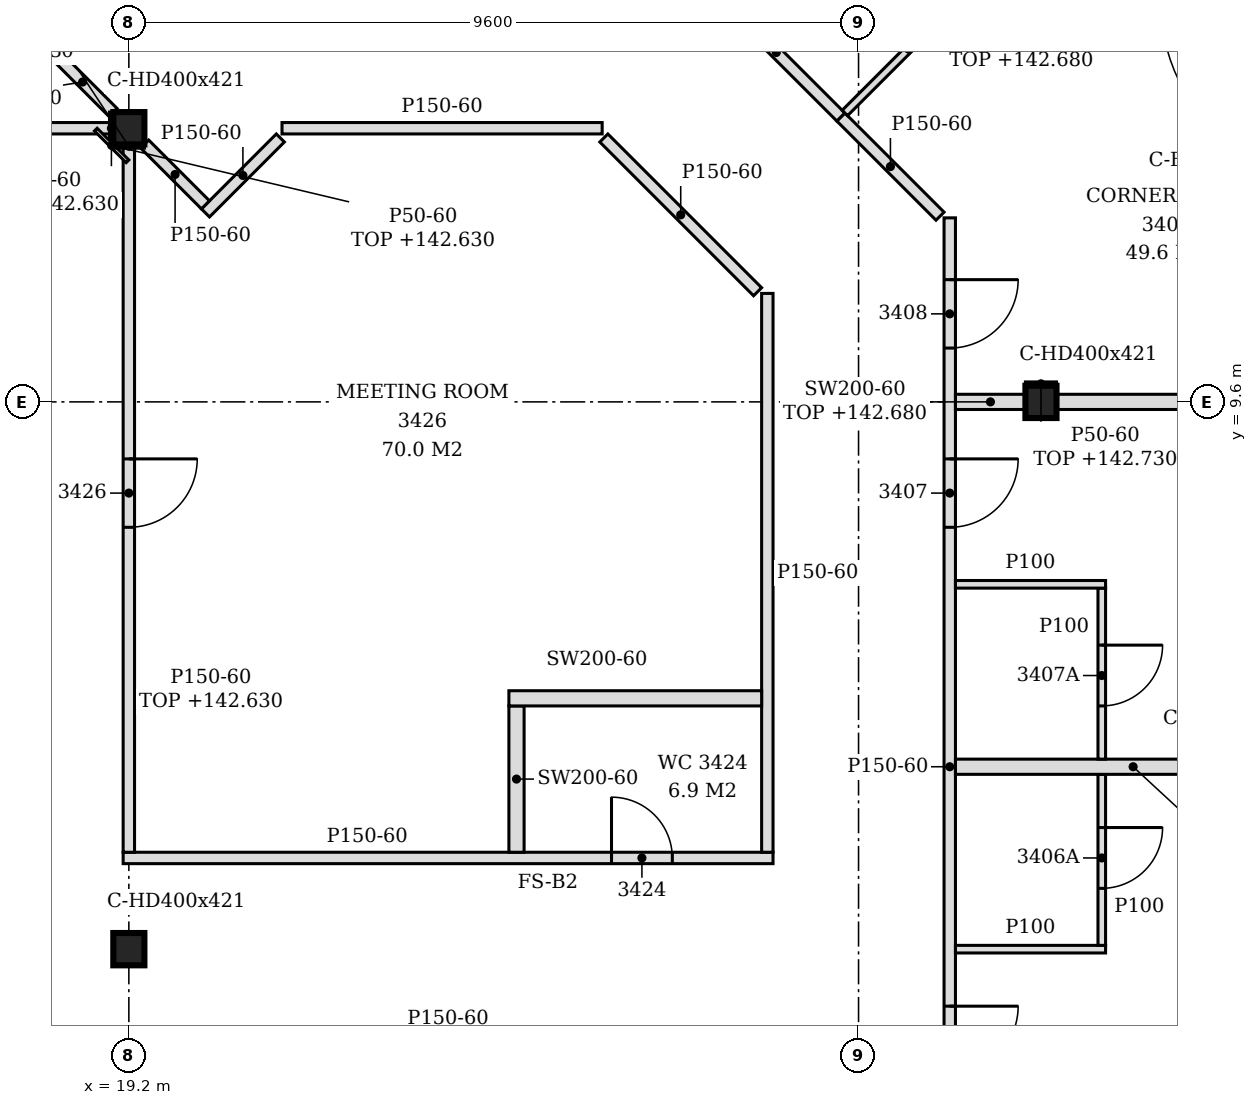
"""IFC4 building model, lengths in metres.
Left out: names, types, materials, properties, quantities, classifications, styles, units other than length and angle.
Written with IfcOpenShell. Run it as: python <this file> out.ifc"""

import sys

from ifc_helpers import new_model, si_unit, direction, frame, frame_2d, origin, origin_2d, place, context, subcontext, project, spatial, polyline, rectangle, i_section, outline, extrude, element, fill, save


model = new_model("IFC4")
c1 = context("Model", 3, precision=1e-05, world=origin(), true_north=direction((0.0, 1.0)))
c2 = subcontext(c1, "Body", "Model", "MODEL_VIEW")
j1 = project(units=[si_unit("LENGTHUNIT", "METRE"), si_unit("PLANEANGLEUNIT", "RADIAN")], contexts=[c1])
p1 = place(None, origin())
s1 = spatial("IfcSite", under=j1, at=p1, CompositionType="ELEMENT")
p2 = place(p1, origin())
s2 = spatial("IfcBuilding", under=s1, at=p2, CompositionType="ELEMENT")
p3 = place(p2, frame((0.0, 0.0, 139.8)))
s3 = spatial("IfcBuildingStorey", under=s2, at=p3, CompositionType="ELEMENT", Elevation=139.8)
for number, where, z_axis, x_axis in (
    (1, (19.2, 2.4, -0.15), (0.0, 0.0, 1.0), (1.0, 0.0, 0.0)),
    (2, (19.2, 13.2, -0.15), (0.0, 0.0, 1.0), (1.0, 0.0, 0.0)),
    (3, (31.2, 9.6, -0.15), (0.0, 0.0, 1.0), (1.0, 0.0, 0.0)),
):
    element("IfcColumn", number, at=place(p3, frame(where, z_axis=z_axis, x_axis=x_axis)), inside=s3, PredefinedType="COLUMN", context=c2, shape_type="SweptSolid", body=[
        extrude(i_section(OverallWidth=0.409, OverallDepth=0.425, WebThickness=0.033, FlangeThickness=0.052, FilletRadius=0.015, at=origin_2d()), origin(), (0.0, 0.0, 1.0), 3.6),
    ])
p4 = place(p3, frame((30.0, -0.813, 0.0), z_axis=(0.0, 0.0, 1.0), x_axis=(0.0, 1.0, 0.0)))
e4 = element("IfcWall", 4, at=p4, inside=s3, PredefinedType="PARTITIONING", context=c2, shape_type="SweptSolid", body=[
    extrude(outline(polyline([(0.0, 0.0), (12.834, 0.0), (12.834, 3.45), (10.518, 3.45), (10.516, 2.88), (10.308, 2.88), (10.306, 3.45), (5.718, 3.45), (5.716, 2.88), (5.508, 2.88), (5.506, 3.45), (0.918, 3.45), (0.916, 2.88), (0.708, 2.88), (0.706, 3.45), (0.0, 3.45), (0.0, 0.0)])), frame((0.0, 0.075, 0.0), z_axis=(0.0, -1.0, 0.0), x_axis=(1.0, 0.0, 0.0)), (0.0, 0.0, 1.0), 0.15),
])
p5 = place(p4, frame((1.563, 0.0, 0.0)))
e5 = element("IfcOpeningElement", 5, at=p5, cuts=e4, PredefinedType="OPENING", context=c2, shape_type="SweptSolid", body=[
    extrude(rectangle(XDim=0.9, YDim=2.1, at=frame_2d((0.45, 1.05))), frame((0.0, 0.085, 0.0), z_axis=(0.0, -1.0, 0.0), x_axis=(1.0, 0.0, 0.0)), (0.0, 0.0, 1.0), 0.17),
])
p6 = place(p4, frame((8.763, 0.0, 0.0)))
e6 = element("IfcOpeningElement", 6, at=p6, cuts=e4, PredefinedType="OPENING", context=c2, shape_type="SweptSolid", body=[
    extrude(rectangle(XDim=0.9, YDim=2.1, at=frame_2d((0.45, 1.05))), frame((0.0, 0.085, 0.0), z_axis=(0.0, -1.0, 0.0), x_axis=(1.0, 0.0, 0.0)), (0.0, 0.0, 1.0), 0.17),
])
p7 = place(p4, frame((11.121, 0.0, 0.0)))
e7 = element("IfcOpeningElement", 7, at=p7, cuts=e4, PredefinedType="OPENING", context=c2, shape_type="SweptSolid", body=[
    extrude(rectangle(XDim=0.9, YDim=2.1, at=frame_2d((0.45, 1.05))), frame((0.0, 0.085, 0.0), z_axis=(0.0, -1.0, 0.0), x_axis=(1.0, 0.0, 0.0)), (0.0, 0.0, 1.0), 0.17),
])
p8 = place(p3, frame((30.075, 2.4, 0.0), z_axis=(0.0, 0.0, 1.0), x_axis=(1.0, 0.0, 0.0)))
e8 = element("IfcWall", 8, at=p8, inside=s3, PredefinedType="PARTITIONING", context=c2, shape_type="SweptSolid", body=[
    extrude(outline(polyline([(0.0, 0.0), (1.975, 0.0), (1.975, 3.45), (1.275, 3.45), (1.273, 2.93), (0.975, 2.93), (0.973, 3.45), (0.0, 3.45), (0.0, 0.0)])), frame((0.0, 0.05, 0.0), z_axis=(0.0, -1.0, 0.0), x_axis=(1.0, 0.0, 0.0)), (0.0, 0.0, 1.0), 0.1),
])
p9 = place(p3, frame((32.0, 2.45, 0.0), z_axis=(0.0, 0.0, 1.0), x_axis=(0.0, 1.0, 0.0)))
e9 = element("IfcWall", 9, at=p9, inside=s3, PredefinedType="PARTITIONING", context=c2, shape_type="SweptSolid", body=[
    extrude(rectangle(XDim=2.25, YDim=0.1, at=frame_2d((1.125, 0.0))), origin(), (0.0, 0.0, 1.0), 3.45),
])
p10 = place(p9, frame((0.75, 0.0, 0.0)))
e10 = element("IfcOpeningElement", 10, at=p10, cuts=e9, PredefinedType="OPENING", context=c2, shape_type="SweptSolid", body=[
    extrude(rectangle(XDim=0.8, YDim=2.1, at=frame_2d((0.4, 1.05))), frame((0.0, 0.06, 0.0), z_axis=(0.0, -1.0, 0.0), x_axis=(1.0, 0.0, 0.0)), (0.0, 0.0, 1.0), 0.12),
])
p11 = place(p3, frame((19.125, 3.6, 0.0), z_axis=(0.0, 0.0, 1.0), x_axis=(1.0, 0.0, 0.0)))
e11 = element("IfcWall", 11, at=p11, inside=s3, PredefinedType="PARTITIONING", context=c2, shape_type="SweptSolid", body=[
    extrude(outline(polyline([(0.0, 0.0), (8.55, 0.0), (8.55, 3.45), (0.225, 3.45), (0.223, 2.83), (0.0, 2.83), (0.0, 0.0)])), frame((0.0, 0.075, 0.0), z_axis=(0.0, -1.0, 0.0), x_axis=(1.0, 0.0, 0.0)), (0.0, 0.0, 1.0), 0.15),
])
p12 = place(p11, frame((6.425, 0.0, 0.0)))
e12 = element("IfcOpeningElement", 12, at=p12, cuts=e11, PredefinedType="OPENING", context=c2, shape_type="SweptSolid", body=[
    extrude(rectangle(XDim=0.8, YDim=2.1, at=frame_2d((0.4, 1.05))), frame((0.0, 0.085, 0.0), z_axis=(0.0, -1.0, 0.0), x_axis=(1.0, 0.0, 0.0)), (0.0, 0.0, 1.0), 0.17),
])
p13 = place(p3, frame((19.2, 3.675, 0.0), z_axis=(0.0, 0.0, 1.0), x_axis=(0.0, 1.0, 0.0)))
e13 = element("IfcWall", 13, at=p13, inside=s3, PredefinedType="PARTITIONING", context=c2, shape_type="SweptSolid", body=[
    extrude(rectangle(XDim=9.312, YDim=0.15, at=frame_2d((4.656, 0.0))), origin(), (0.0, 0.0, 1.0), 2.83),
])
p14 = place(p13, frame((4.275, 0.0, 0.0)))
e14 = element("IfcOpeningElement", 14, at=p14, cuts=e13, PredefinedType="OPENING", context=c2, shape_type="SweptSolid", body=[
    extrude(rectangle(XDim=0.9, YDim=2.1, at=frame_2d((0.45, 1.05))), frame((0.0, 0.085, 0.0), z_axis=(0.0, -1.0, 0.0), x_axis=(1.0, 0.0, 0.0)), (0.0, 0.0, 1.0), 0.17),
])
p15 = place(p3, frame((24.3, 3.675, 0.0), z_axis=(0.0, 0.0, 1.0), x_axis=(0.0, 1.0, 0.0)))
e15 = element("IfcWall", 15, at=p15, inside=s3, PredefinedType="PARTITIONING", context=c2, shape_type="SweptSolid", body=[
    extrude(outline(polyline([(0.0, 0.0), (1.925, 0.0), (1.925, 3.45), (1.23, 3.45), (1.228, 2.88), (1.02, 2.88), (1.018, 3.45), (0.0, 3.45), (0.0, 0.0)])), frame((0.0, 0.1, 0.0), z_axis=(0.0, -1.0, 0.0), x_axis=(1.0, 0.0, 0.0)), (0.0, 0.0, 1.0), 0.2),
])
p16 = place(p3, frame((27.6, 3.675, 0.0), z_axis=(0.0, 0.0, 1.0), x_axis=(0.0, 1.0, 0.0)))
e16 = element("IfcWall", 16, at=p16, inside=s3, PredefinedType="PARTITIONING", context=c2, shape_type="SweptSolid", body=[
    extrude(outline(polyline([(0.0, 0.0), (7.352, 0.0), (7.352, 3.45), (6.03, 3.45), (6.028, 2.88), (5.82, 2.88), (5.818, 3.45), (1.23, 3.45), (1.228, 2.88), (1.02, 2.88), (1.018, 3.45), (0.0, 3.45), (0.0, 0.0)])), frame((0.0, 0.075, 0.0), z_axis=(0.0, -1.0, 0.0), x_axis=(1.0, 0.0, 0.0)), (0.0, 0.0, 1.0), 0.15),
])
p17 = place(p3, frame((30.075, 4.8, 0.0), z_axis=(0.0, 0.0, 1.0), x_axis=(1.0, 0.0, 0.0)))
e17 = element("IfcWall", 17, at=p17, inside=s3, PredefinedType="PARTITIONING", context=c2, shape_type="SweptSolid", body=[
    extrude(rectangle(XDim=4.675, YDim=0.2, at=frame_2d((2.337, 0.0))), origin(), (0.0, 0.0, 1.0), 2.88),
])
p18 = place(p3, frame((32.0, 4.9, 0.0), z_axis=(0.0, 0.0, 1.0), x_axis=(0.0, 1.0, 0.0)))
e18 = element("IfcWall", 18, at=p18, inside=s3, PredefinedType="PARTITIONING", context=c2, shape_type="SweptSolid", body=[
    extrude(rectangle(XDim=2.25, YDim=0.1, at=frame_2d((1.125, 0.0))), origin(), (0.0, 0.0, 1.0), 3.45),
])
p19 = place(p18, frame((0.7, 0.0, 0.0)))
e19 = element("IfcOpeningElement", 19, at=p19, cuts=e18, PredefinedType="OPENING", context=c2, shape_type="SweptSolid", body=[
    extrude(rectangle(XDim=0.8, YDim=2.1, at=frame_2d((0.4, 1.05))), frame((0.0, 0.06, 0.0), z_axis=(0.0, -1.0, 0.0), x_axis=(1.0, 0.0, 0.0)), (0.0, 0.0, 1.0), 0.12),
])
p20 = place(p3, frame((24.2, 5.7, 0.0), z_axis=(0.0, 0.0, 1.0), x_axis=(1.0, 0.0, 0.0)))
e20 = element("IfcWall", 20, at=p20, inside=s3, PredefinedType="PARTITIONING", context=c2, shape_type="SweptSolid", body=[
    extrude(rectangle(XDim=3.325, YDim=0.2, at=frame_2d((1.663, 0.0))), origin(), (0.0, 0.0, 1.0), 3.45),
])
p21 = place(p3, frame((30.075, 7.2, 0.0), z_axis=(0.0, 0.0, 1.0), x_axis=(1.0, 0.0, 0.0)))
e21 = element("IfcWall", 21, at=p21, inside=s3, PredefinedType="PARTITIONING", context=c2, shape_type="SweptSolid", body=[
    extrude(outline(polyline([(0.0, 0.0), (1.975, 0.0), (1.975, 3.45), (1.275, 3.45), (1.273, 2.93), (0.975, 2.93), (0.973, 3.45), (0.0, 3.45), (0.0, 0.0)])), frame((0.0, 0.05, 0.0), z_axis=(0.0, -1.0, 0.0), x_axis=(1.0, 0.0, 0.0)), (0.0, 0.0, 1.0), 0.1),
])
p22 = place(p3, frame((30.075, 9.6, 0.0), z_axis=(0.0, 0.0, 1.0), x_axis=(1.0, 0.0, 0.0)))
e22 = element("IfcWall", 22, at=p22, inside=s3, PredefinedType="PARTITIONING", context=c2, shape_type="SweptSolid", body=[
    extrude(rectangle(XDim=0.921, YDim=0.2, at=frame_2d((0.46, 0.0))), origin(), (0.0, 0.0, 1.0), 2.88),
])
p23 = place(p3, frame((31.405, 9.6, 0.0), z_axis=(0.0, 0.0, 1.0), x_axis=(1.0, 0.0, 0.0)))
e23 = element("IfcWall", 23, at=p23, inside=s3, PredefinedType="PARTITIONING", context=c2, shape_type="SweptSolid", body=[
    extrude(outline(polyline([(0.0, 0.0), (4.245, 0.0), (4.246, 3.07), (3.845, 3.07), (3.844, 2.93), (3.545, 2.93), (3.543, 3.07), (0.0, 3.07), (0.0, 0.0)])), frame((0.0, 0.1, 0.0), z_axis=(0.0, -1.0, 0.0), x_axis=(1.0, 0.0, 0.0)), (0.0, 0.0, 1.0), 0.2),
])
p24 = place(p3, frame((27.472, 11.049, 0.0), z_axis=(0.0, 0.0, 1.0), x_axis=(-0.707106781187, 0.707106781187, 0.0)))
e24 = element("IfcWall", 24, at=p24, inside=s3, PredefinedType="PARTITIONING", context=c2, shape_type="SweptSolid", body=[
    extrude(rectangle(XDim=2.861, YDim=0.15, at=frame_2d((1.43, 0.0))), origin(), (0.0, 0.0, 1.0), 3.45),
])
p25 = place(p3, frame((29.872, 12.043, 0.0), z_axis=(0.0, 0.0, 1.0), x_axis=(-0.707172918471, 0.707040637716, 0.0)))
e25 = element("IfcWall", 25, at=p25, inside=s3, PredefinedType="PARTITIONING", context=c2, shape_type="SweptSolid", body=[
    extrude(rectangle(XDim=1.846, YDim=0.15, at=frame_2d((0.923, 0.0))), origin(), (0.0, 0.0, 1.0), 3.45),
])
p26 = place(p3, frame((20.208, 12.086, 0.0), z_axis=(0.0, 0.0, 1.0), x_axis=(0.706756381459, 0.707457007363, 0.0)))
e26 = element("IfcWall", 26, at=p26, inside=s3, PredefinedType="PARTITIONING", context=c2, shape_type="SweptSolid", body=[
    extrude(rectangle(XDim=1.394, YDim=0.15, at=frame_2d((0.697, 0.0))), origin(), (0.0, 0.0, 1.0), 3.45),
])
p27 = place(p3, frame((20.208, 12.192, 0.0), z_axis=(0.0, 0.0, 1.0), x_axis=(-0.70721474466, 0.706998801226, 0.0)))
e27 = element("IfcWall", 27, at=p27, inside=s3, PredefinedType="PARTITIONING", context=c2, shape_type="SweptSolid", body=[
    extrude(rectangle(XDim=1.131, YDim=0.15, at=frame_2d((0.565, 0.0))), origin(), (0.0, 0.0, 1.0), 3.45),
])
p28 = place(p3, frame((7.405, 13.2, 0.0), z_axis=(0.0, 0.0, 1.0), x_axis=(1.0, 0.0, 0.0)))
e28 = element("IfcWall", 28, at=p28, inside=s3, PredefinedType="PARTITIONING", context=c2, shape_type="SweptSolid", body=[
    extrude(rectangle(XDim=11.591, YDim=0.15, at=frame_2d((5.795, 0.0))), origin(), (0.0, 0.0, 1.0), 2.83),
])
p29 = place(p28, frame((5.345, 0.0, 0.0)))
e29 = element("IfcOpeningElement", 29, at=p29, cuts=e28, PredefinedType="OPENING", context=c2, shape_type="SweptSolid", body=[
    extrude(rectangle(XDim=0.9, YDim=2.1, at=frame_2d((0.45, 1.05))), frame((0.0, 0.085, 0.0), z_axis=(0.0, -1.0, 0.0), x_axis=(1.0, 0.0, 0.0)), (0.0, 0.0, 1.0), 0.17),
])
p30 = place(p3, frame((21.215, 13.2, 0.0), z_axis=(0.0, 0.0, 1.0), x_axis=(1.0, 0.0, 0.0)))
e30 = element("IfcWall", 30, at=p30, inside=s3, PredefinedType="PARTITIONING", context=c2, shape_type="SweptSolid", body=[
    extrude(rectangle(XDim=4.212, YDim=0.15, at=frame_2d((2.106, 0.0))), origin(), (0.0, 0.0, 1.0), 3.45),
])
p31 = place(p3, frame((28.567, 13.348, 0.0), z_axis=(0.0, 0.0, 1.0), x_axis=(-0.707310148094, 0.706903355773, 0.0)))
e31 = element("IfcWall", 31, at=p31, inside=s3, PredefinedType="PARTITIONING", context=c2, shape_type="SweptSolid", body=[
    extrude(rectangle(XDim=2.401, YDim=0.15, at=frame_2d((1.2, 0.0))), origin(), (0.0, 0.0, 1.0), 2.88),
])
p32 = place(p3, frame((18.991, 13.408, 0.0), z_axis=(0.0, 0.0, 1.0), x_axis=(-0.706998801226, 0.70721474466, 0.0)))
e32 = element("IfcWall", 32, at=p32, inside=s3, PredefinedType="PARTITIONING", context=c2, shape_type="SweptSolid", body=[
    extrude(rectangle(XDim=1.131, YDim=0.15, at=frame_2d((0.565, 0.0))), origin(), (0.0, 0.0, 1.0), 3.45),
])
p33 = place(p3, frame((28.62, 13.401, 0.0), z_axis=(0.0, 0.0, 1.0), x_axis=(0.707055379538, 0.707158179099, 0.0)))
e33 = element("IfcWall", 33, at=p33, inside=s3, PredefinedType="PARTITIONING", context=c2, shape_type="SweptSolid", body=[
    extrude(rectangle(XDim=2.375, YDim=0.1, at=frame_2d((1.188, 0.0))), origin(), (0.0, 0.0, 1.0), 2.88),
])
p34 = place(p3, frame((18.086, 14.208, 0.0), z_axis=(0.0, 0.0, 1.0), x_axis=(0.70739723372, 0.706816209298, 0.0)))
e34 = element("IfcWall", 34, at=p34, inside=s3, PredefinedType="PARTITIONING", context=c2, shape_type="SweptSolid", body=[
    extrude(rectangle(XDim=1.681, YDim=0.15, at=frame_2d((0.84, 0.0))), origin(), (0.0, 0.0, 1.0), 2.73),
])
p35 = place(p3, frame((18.97, 12.988, 0.0), z_axis=(0.0, 0.0, 1.0), x_axis=(0.0, 1.0, 0.0)))
e35 = element("IfcWall", 35, at=p35, inside=s3, PredefinedType="PARTITIONING", context=c2, shape_type="SweptSolid", body=[
    extrude(rectangle(XDim=0.425, YDim=0.05, at=frame_2d((0.212, 0.0))), origin(), (0.0, 0.0, 1.0), 2.83),
])
p36 = place(p3, frame((30.996, 9.837, 0.0), z_axis=(0.0, 0.0, 1.0), x_axis=(1.0, 0.0, 0.0)))
e36 = element("IfcWall", 36, at=p36, inside=s3, PredefinedType="PARTITIONING", context=c2, shape_type="SweptSolid", body=[
    extrude(rectangle(XDim=0.409, YDim=0.05, at=frame_2d((0.205, 0.0))), origin(), (0.0, 0.0, 1.0), 2.93),
])
p37 = place(p3, frame((19.182, 12.765, 0.0), z_axis=(0.0, 0.0, 1.0), x_axis=(-0.707106781187, 0.707106781187, 0.0)))
e37 = element("IfcWall", 37, at=p37, inside=s3, PredefinedType="PARTITIONING", context=c2, shape_type="SweptSolid", body=[
    extrude(rectangle(XDim=0.59, YDim=0.05, at=frame_2d((0.295, 0.0))), origin(), (0.0, 0.0, 1.0), 2.83),
])
p38 = place(p3, frame((18.996, 12.962, 0.0), z_axis=(0.0, 0.0, 1.0), x_axis=(1.0, 0.0, 0.0)))
e38 = element("IfcWall", 38, at=p38, inside=s3, PredefinedType="PARTITIONING", context=c2, shape_type="SweptSolid", body=[
    extrude(rectangle(XDim=0.409, YDim=0.05, at=frame_2d((0.205, 0.0))), origin(), (0.0, 0.0, 1.0), 2.83),
])
p39 = place(p5, frame((0.9, 0.0, 0.0), z_axis=(0.0, 0.0, 1.0), x_axis=(-1.0, 0.0, 0.0)))
e39 = element("IfcDoor", 39, at=p39, inside=s3, OperationType="SINGLE_SWING_LEFT", PredefinedType="DOOR", context=c2, shape_type="SweptSolid", body=[
    extrude(rectangle(XDim=0.9, YDim=2.1, at=frame_2d((0.45, 1.05))), frame((0.0, 0.025, 0.0), z_axis=(0.0, -1.0, 0.0), x_axis=(1.0, 0.0, 0.0)), (0.0, 0.0, 1.0), 0.05),
])
fill(e5, e39)
p40 = place(p10, frame((0.8, 0.0, 0.0), z_axis=(0.0, 0.0, 1.0), x_axis=(-1.0, 0.0, 0.0)))
e40 = element("IfcDoor", 40, at=p40, inside=s3, OperationType="SINGLE_SWING_LEFT", PredefinedType="DOOR", context=c2, shape_type="SweptSolid", body=[
    extrude(rectangle(XDim=0.8, YDim=2.1, at=frame_2d((0.4, 1.05))), frame((0.0, 0.025, 0.0), z_axis=(0.0, -1.0, 0.0), x_axis=(1.0, 0.0, 0.0)), (0.0, 0.0, 1.0), 0.05),
])
fill(e10, e40)
p41 = place(p6, frame((0.9, 0.0, 0.0), z_axis=(0.0, 0.0, 1.0), x_axis=(-1.0, 0.0, 0.0)))
e41 = element("IfcDoor", 41, at=p41, inside=s3, OperationType="SINGLE_SWING_LEFT", PredefinedType="DOOR", context=c2, shape_type="SweptSolid", body=[
    extrude(rectangle(XDim=0.9, YDim=2.1, at=frame_2d((0.45, 1.05))), frame((0.0, 0.025, 0.0), z_axis=(0.0, -1.0, 0.0), x_axis=(1.0, 0.0, 0.0)), (0.0, 0.0, 1.0), 0.05),
])
fill(e6, e41)
p42 = place(p19, frame((0.8, 0.0, 0.0), z_axis=(0.0, 0.0, 1.0), x_axis=(-1.0, 0.0, 0.0)))
e42 = element("IfcDoor", 42, at=p42, inside=s3, OperationType="SINGLE_SWING_LEFT", PredefinedType="DOOR", context=c2, shape_type="SweptSolid", body=[
    extrude(rectangle(XDim=0.8, YDim=2.1, at=frame_2d((0.4, 1.05))), frame((0.0, 0.025, 0.0), z_axis=(0.0, -1.0, 0.0), x_axis=(1.0, 0.0, 0.0)), (0.0, 0.0, 1.0), 0.05),
])
fill(e19, e42)
p43 = place(p7, frame((0.9, 0.0, 0.0), z_axis=(0.0, 0.0, 1.0), x_axis=(-1.0, 0.0, 0.0)))
e43 = element("IfcDoor", 43, at=p43, inside=s3, OperationType="SINGLE_SWING_LEFT", PredefinedType="DOOR", context=c2, shape_type="SweptSolid", body=[
    extrude(rectangle(XDim=0.9, YDim=2.1, at=frame_2d((0.45, 1.05))), frame((0.0, 0.025, 0.0), z_axis=(0.0, -1.0, 0.0), x_axis=(1.0, 0.0, 0.0)), (0.0, 0.0, 1.0), 0.05),
])
fill(e7, e43)
p44 = place(p12, origin())
e44 = element("IfcDoor", 44, at=p44, inside=s3, OperationType="SINGLE_SWING_LEFT", PredefinedType="DOOR", context=c2, shape_type="SweptSolid", body=[
    extrude(rectangle(XDim=0.8, YDim=2.1, at=frame_2d((0.4, 1.05))), frame((0.0, 0.025, 0.0), z_axis=(0.0, -1.0, 0.0), x_axis=(1.0, 0.0, 0.0)), (0.0, 0.0, 1.0), 0.05),
])
fill(e12, e44)
p45 = place(p14, frame((0.9, 0.0, 0.0), z_axis=(0.0, 0.0, 1.0), x_axis=(-1.0, 0.0, 0.0)))
e45 = element("IfcDoor", 45, at=p45, inside=s3, OperationType="SINGLE_SWING_LEFT", PredefinedType="DOOR", context=c2, shape_type="SweptSolid", body=[
    extrude(rectangle(XDim=0.9, YDim=2.1, at=frame_2d((0.45, 1.05))), frame((0.0, 0.025, 0.0), z_axis=(0.0, -1.0, 0.0), x_axis=(1.0, 0.0, 0.0)), (0.0, 0.0, 1.0), 0.05),
])
fill(e14, e45)
save(model, sys.argv[1])
